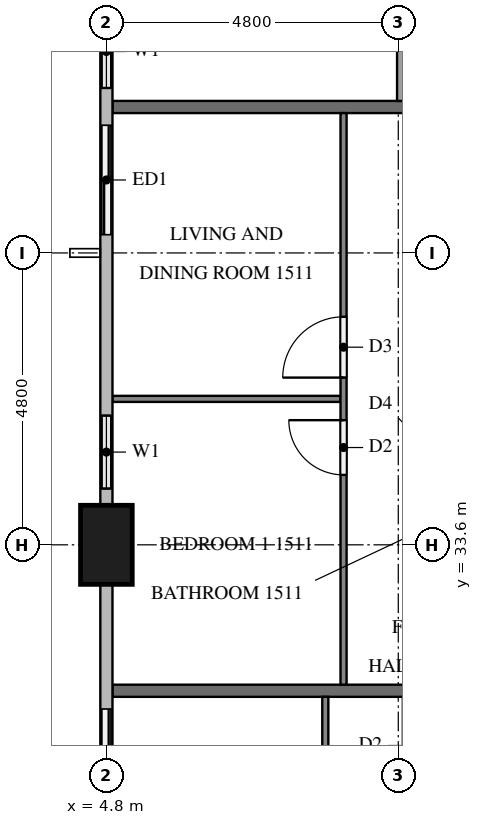
"""IFC4 building model, lengths in metres.
Left out: names, types, materials, properties, quantities, classifications, styles, units other than length and angle.
Written with IfcOpenShell. Run it as: python <this file> out.ifc"""

import sys

from ifc_helpers import new_model, si_unit, direction, frame, frame_2d, origin, origin_2d, place, context, subcontext, project, spatial, rectangle, extrude, element, fill, save


model = new_model("IFC4")
c1 = context("Model", 3, precision=1e-05, world=origin(), true_north=direction((0.0, 1.0)))
c2 = subcontext(c1, "Body", "Model", "MODEL_VIEW")
j1 = project(units=[si_unit("LENGTHUNIT", "METRE"), si_unit("PLANEANGLEUNIT", "RADIAN")], contexts=[c1])
p1 = place(None, origin())
s1 = spatial("IfcSite", under=j1, at=p1, CompositionType="ELEMENT")
p2 = place(p1, origin())
s2 = spatial("IfcBuilding", under=s1, at=p2, CompositionType="ELEMENT")
p3 = place(p2, frame((0.0, 0.0, 62.8)))
s3 = spatial("IfcBuildingStorey", under=s2, at=p3, CompositionType="ELEMENT", Elevation=62.8)
p4 = place(p3, frame((4.8, 33.6, 0.0), z_axis=(0.0, 0.0, 1.0), x_axis=(0.0, 1.0, 0.0)))
e1 = element("IfcColumn", 1, at=p4, inside=s3, PredefinedType="COLUMN", context=c2, shape_type="SweptSolid", body=[
    extrude(rectangle(XDim=1.3, YDim=0.85, at=origin_2d()), origin(), (0.0, 0.0, 1.0), 3.2),
])
p5 = place(p3, frame((4.8, 42.625, 0.0), z_axis=(0.0, 0.0, 1.0), x_axis=(0.0, -1.0, 0.0)))
e2 = element("IfcWall", 2, at=p5, inside=s3, PredefinedType="SOLIDWALL", context=c2, shape_type="SweptSolid", body=[
    extrude(rectangle(XDim=4.225, YDim=0.15, at=frame_2d((2.113, 0.0))), origin(), (0.0, 0.0, 1.0), 3.2),
])
p6 = place(p5, frame((0.312, 0.0, 0.9)))
e3 = element("IfcOpeningElement", 3, at=p6, cuts=e2, PredefinedType="OPENING", context=c2, shape_type="SweptSolid", body=[
    extrude(rectangle(XDim=1.2, YDim=1.4, at=frame_2d((0.6, 0.7))), frame((0.0, 0.085, 0.0), z_axis=(0.0, -1.0, 0.0), x_axis=(1.0, 0.0, 0.0)), (0.0, 0.0, 1.0), 0.17),
])
p7 = place(p5, frame((2.125, 0.0, 0.0)))
e4 = element("IfcOpeningElement", 4, at=p7, cuts=e2, PredefinedType="OPENING", context=c2, shape_type="SweptSolid", body=[
    extrude(rectangle(XDim=1.8, YDim=2.4, at=frame_2d((0.9, 1.2))), frame((0.0, 0.085, 0.0), z_axis=(0.0, -1.0, 0.0), x_axis=(1.0, 0.0, 0.0)), (0.0, 0.0, 1.0), 0.17),
])
p8 = place(p3, frame((4.8, 36.0, 0.0), z_axis=(0.0, 0.0, 1.0), x_axis=(0.0, -1.0, 0.0)))
e5 = element("IfcWall", 5, at=p8, inside=s3, PredefinedType="SOLIDWALL", context=c2, shape_type="SweptSolid", body=[
    extrude(rectangle(XDim=1.75, YDim=0.15, at=frame_2d((0.875, 0.0))), origin(), (0.0, 0.0, 1.0), 3.2),
])
p9 = place(p8, frame((0.275, 0.0, 0.9)))
e6 = element("IfcOpeningElement", 6, at=p9, cuts=e5, PredefinedType="OPENING", context=c2, shape_type="SweptSolid", body=[
    extrude(rectangle(XDim=1.2, YDim=1.4, at=frame_2d((0.6, 0.7))), frame((0.0, 0.085, 0.0), z_axis=(0.0, -1.0, 0.0), x_axis=(1.0, 0.0, 0.0)), (0.0, 0.0, 1.0), 0.17),
])
p10 = place(p3, frame((4.8, 31.2, 0.0), z_axis=(0.0, 0.0, 1.0), x_axis=(0.0, -1.0, 0.0)))
e7 = element("IfcWall", 7, at=p10, inside=s3, PredefinedType="SOLIDWALL", context=c2, shape_type="SweptSolid", body=[
    extrude(rectangle(XDim=2.4, YDim=0.15, at=frame_2d((1.2, 0.0))), origin(), (0.0, 0.0, 1.0), 3.2),
])
p11 = place(p10, frame((0.3, 0.0, 0.0)))
e8 = element("IfcOpeningElement", 8, at=p11, cuts=e7, PredefinedType="OPENING", context=c2, shape_type="SweptSolid", body=[
    extrude(rectangle(XDim=1.8, YDim=2.4, at=frame_2d((0.9, 1.2))), frame((0.0, 0.085, 0.0), z_axis=(0.0, -1.0, 0.0), x_axis=(1.0, 0.0, 0.0)), (0.0, 0.0, 1.0), 0.17),
])
for number, where, z_axis, x_axis in (
    (9, (4.9, 40.8, 0.0), (0.0, 0.0, 1.0), (1.0, 0.0, 0.0)),
    (10, (4.9, 31.2, 0.0), (0.0, 0.0, 1.0), (1.0, 0.0, 0.0)),
):
    element("IfcWall", number, at=place(p3, frame(where, z_axis=z_axis, x_axis=x_axis)), inside=s3, PredefinedType="PARTITIONING", context=c2, shape_type="SweptSolid", body=[
        extrude(rectangle(XDim=7.0, YDim=0.2, at=frame_2d((3.5, 0.0))), origin(), (0.0, 0.0, 1.0), 3.2),
    ])
p12 = place(p3, frame((9.655, 40.9, 0.0), z_axis=(0.0, 0.0, 1.0), x_axis=(0.0, 1.0, 0.0)))
e11 = element("IfcWall", 11, at=p12, inside=s3, PredefinedType="PARTITIONING", context=c2, shape_type="SweptSolid", body=[
    extrude(rectangle(XDim=1.775, YDim=0.15, at=frame_2d((0.888, 0.0))), origin(), (0.0, 0.0, 1.0), 3.2),
])
p13 = place(p3, frame((8.65, 36.0, 0.0), z_axis=(0.0, 0.0, 1.0), x_axis=(-1.0, 0.0, 0.0)))
e12 = element("IfcWall", 12, at=p13, inside=s3, PredefinedType="PARTITIONING", context=c2, shape_type="SweptSolid", body=[
    extrude(rectangle(XDim=3.75, YDim=0.1, at=frame_2d((1.875, 0.0))), origin(), (0.0, 0.0, 1.0), 3.2),
])
p14 = place(p3, frame((8.7, 31.3, 0.0), z_axis=(0.0, 0.0, 1.0), x_axis=(0.0, 1.0, 0.0)))
e13 = element("IfcWall", 13, at=p14, inside=s3, PredefinedType="PARTITIONING", context=c2, shape_type="SweptSolid", body=[
    extrude(rectangle(XDim=9.4, YDim=0.1, at=frame_2d((4.7, 0.0))), origin(), (0.0, 0.0, 1.0), 3.2),
])
p15 = place(p14, frame((3.45, 0.0, 0.0)))
e14 = element("IfcOpeningElement", 14, at=p15, cuts=e13, PredefinedType="OPENING", context=c2, shape_type="SweptSolid", body=[
    extrude(rectangle(XDim=0.9, YDim=2.1, at=frame_2d((0.45, 1.05))), frame((0.0, 0.06, 0.0), z_axis=(0.0, -1.0, 0.0), x_axis=(1.0, 0.0, 0.0)), (0.0, 0.0, 1.0), 0.12),
])
p16 = place(p14, frame((5.05, 0.0, 0.0)))
e15 = element("IfcOpeningElement", 15, at=p16, cuts=e13, PredefinedType="OPENING", context=c2, shape_type="SweptSolid", body=[
    extrude(rectangle(XDim=1.0, YDim=2.1, at=frame_2d((0.5, 1.05))), frame((0.0, 0.06, 0.0), z_axis=(0.0, -1.0, 0.0), x_axis=(1.0, 0.0, 0.0)), (0.0, 0.0, 1.0), 0.12),
])
p17 = place(p3, frame((8.4, 24.1, 0.0), z_axis=(0.0, 0.0, 1.0), x_axis=(0.0, 1.0, 0.0)))
e16 = element("IfcWall", 16, at=p17, inside=s3, PredefinedType="PARTITIONING", context=c2, shape_type="SweptSolid", body=[
    extrude(rectangle(XDim=7.0, YDim=0.1, at=frame_2d((3.5, 0.0))), origin(), (0.0, 0.0, 1.0), 3.2),
])
p18 = place(p17, frame((0.3, 0.0, 0.0)))
e17 = element("IfcOpeningElement", 17, at=p18, cuts=e16, PredefinedType="OPENING", context=c2, shape_type="SweptSolid", body=[
    extrude(rectangle(XDim=1.0, YDim=2.1, at=frame_2d((0.5, 1.05))), frame((0.0, 0.06, 0.0), z_axis=(0.0, -1.0, 0.0), x_axis=(1.0, 0.0, 0.0)), (0.0, 0.0, 1.0), 0.12),
])
p19 = place(p6, origin())
e18 = element("IfcWindow", 18, at=p19, inside=s3, PartitioningType="SINGLE_PANEL", PredefinedType="WINDOW", context=c2, shape_type="SweptSolid", body=[
    extrude(rectangle(XDim=1.2, YDim=1.4, at=frame_2d((0.6, 0.7))), frame((0.0, 0.03, 0.0), z_axis=(0.0, -1.0, 0.0), x_axis=(1.0, 0.0, 0.0)), (0.0, 0.0, 1.0), 0.06),
])
fill(e3, e18)
p20 = place(p7, origin())
e19 = element("IfcDoor", 19, at=p20, inside=s3, OperationType="SLIDING_TO_RIGHT", PredefinedType="DOOR", context=c2, shape_type="SweptSolid", body=[
    extrude(rectangle(XDim=1.8, YDim=2.4, at=frame_2d((0.9, 1.2))), frame((0.0, 0.025, 0.0), z_axis=(0.0, -1.0, 0.0), x_axis=(1.0, 0.0, 0.0)), (0.0, 0.0, 1.0), 0.05),
])
fill(e4, e19)
p21 = place(p9, origin())
e20 = element("IfcWindow", 20, at=p21, inside=s3, PartitioningType="SINGLE_PANEL", PredefinedType="WINDOW", context=c2, shape_type="SweptSolid", body=[
    extrude(rectangle(XDim=1.2, YDim=1.4, at=frame_2d((0.6, 0.7))), frame((0.0, 0.03, 0.0), z_axis=(0.0, -1.0, 0.0), x_axis=(1.0, 0.0, 0.0)), (0.0, 0.0, 1.0), 0.06),
])
fill(e6, e20)
p22 = place(p11, origin())
e21 = element("IfcDoor", 21, at=p22, inside=s3, OperationType="SLIDING_TO_LEFT", PredefinedType="DOOR", context=c2, shape_type="SweptSolid", body=[
    extrude(rectangle(XDim=1.8, YDim=2.4, at=frame_2d((0.9, 1.2))), frame((0.0, 0.025, 0.0), z_axis=(0.0, -1.0, 0.0), x_axis=(1.0, 0.0, 0.0)), (0.0, 0.0, 1.0), 0.05),
])
fill(e8, e21)
p23 = place(p15, origin())
e22 = element("IfcDoor", 22, at=p23, inside=s3, OperationType="SINGLE_SWING_RIGHT", PredefinedType="DOOR", context=c2, shape_type="SweptSolid", body=[
    extrude(rectangle(XDim=0.9, YDim=2.1, at=frame_2d((0.45, 1.05))), frame((0.0, 0.025, 0.0), z_axis=(0.0, -1.0, 0.0), x_axis=(1.0, 0.0, 0.0)), (0.0, 0.0, 1.0), 0.05),
])
fill(e14, e22)
p24 = place(p16, origin())
e23 = element("IfcDoor", 23, at=p24, inside=s3, OperationType="SINGLE_SWING_LEFT", PredefinedType="DOOR", context=c2, shape_type="SweptSolid", body=[
    extrude(rectangle(XDim=1.0, YDim=2.1, at=frame_2d((0.5, 1.05))), frame((0.0, 0.025, 0.0), z_axis=(0.0, -1.0, 0.0), x_axis=(1.0, 0.0, 0.0)), (0.0, 0.0, 1.0), 0.05),
])
fill(e15, e23)
save(model, sys.argv[1])
